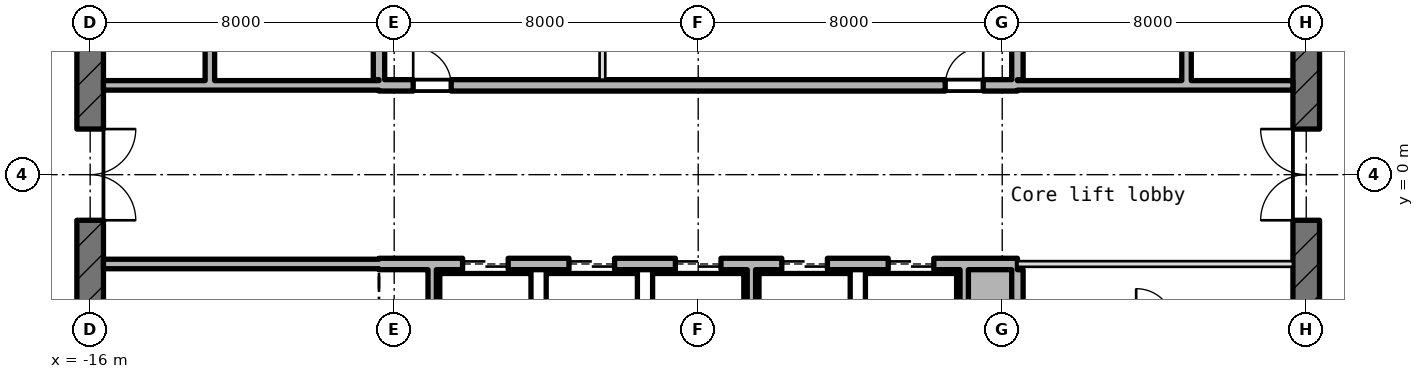
"""IFC4 building model, lengths in metres.
Left out: names, types, materials, properties, quantities, classifications, styles, units other than length and angle.
Written with IfcOpenShell. Run it as: python <this file> out.ifc"""

import sys

from ifc_helpers import new_model, si_unit, direction, frame, frame_2d, origin, place, context, subcontext, project, spatial, rectangle, extrude, element, fill, save


model = new_model("IFC4")
c1 = context("Model", 3, precision=1e-05, world=origin(), true_north=direction((0.0, 1.0)))
c2 = subcontext(c1, "Body", "Model", "MODEL_VIEW")
j1 = project(units=[si_unit("LENGTHUNIT", "METRE"), si_unit("PLANEANGLEUNIT", "RADIAN")], contexts=[c1])
p1 = place(None, origin())
s1 = spatial("IfcSite", under=j1, at=p1, CompositionType="ELEMENT")
p2 = place(p1, origin())
s2 = spatial("IfcBuilding", under=s1, at=p2, CompositionType="ELEMENT")
p3 = place(p2, frame((0.0, 0.0, 279.1)))
s3 = spatial("IfcBuildingStorey", under=s2, at=p3, CompositionType="ELEMENT", Elevation=279.1)
p4 = place(p3, frame((16.0, -10.145, -0.25), z_axis=(0.0, 0.0, 1.0), x_axis=(0.0, 1.0, 0.0)))
e1 = element("IfcWall", 1, at=p4, inside=s3, PredefinedType="SHEAR", context=c2, shape_type="SweptSolid", body=[
    extrude(rectangle(XDim=20.29, YDim=0.7, at=frame_2d((10.145, 0.0))), origin(), (0.0, 0.0, 1.0), 5.47),
])
p5 = place(p4, frame((8.945, 0.0, 0.25)))
e2 = element("IfcOpeningElement", 2, at=p5, cuts=e1, PredefinedType="OPENING", context=c2, shape_type="SweptSolid", body=[
    extrude(rectangle(XDim=2.4, YDim=2.1, at=frame_2d((1.2, 1.05))), frame((0.0, 0.36, 0.0), z_axis=(0.0, -1.0, 0.0), x_axis=(1.0, 0.0, 0.0)), (0.0, 0.0, 1.0), 0.72),
])
p6 = place(p4, frame((13.545, 0.0, 0.25)))
e3 = element("IfcOpeningElement", 3, at=p6, cuts=e1, PredefinedType="OPENING", context=c2, shape_type="SweptSolid", body=[
    extrude(rectangle(XDim=1.2, YDim=2.1, at=frame_2d((0.6, 1.05))), frame((0.0, 0.36, 0.0), z_axis=(0.0, -1.0, 0.0), x_axis=(1.0, 0.0, 0.0)), (0.0, 0.0, 1.0), 0.72),
])
p7 = place(p4, frame((4.745, 0.0, 0.25)))
e4 = element("IfcOpeningElement", 4, at=p7, cuts=e1, PredefinedType="OPENING", context=c2, shape_type="SweptSolid", body=[
    extrude(rectangle(XDim=1.2, YDim=2.1, at=frame_2d((0.6, 1.05))), frame((0.0, 0.36, 0.0), z_axis=(0.0, -1.0, 0.0), x_axis=(1.0, 0.0, 0.0)), (0.0, 0.0, 1.0), 0.72),
])
p8 = place(p3, frame((-16.0, 10.145, -0.25), z_axis=(0.0, 0.0, 1.0), x_axis=(0.0, -1.0, 0.0)))
e5 = element("IfcWall", 5, at=p8, inside=s3, PredefinedType="SHEAR", context=c2, shape_type="SweptSolid", body=[
    extrude(rectangle(XDim=20.29, YDim=0.7, at=frame_2d((10.145, 0.0))), origin(), (0.0, 0.0, 1.0), 5.47),
])
p9 = place(p8, frame((8.945, 0.0, 0.25)))
e6 = element("IfcOpeningElement", 6, at=p9, cuts=e5, PredefinedType="OPENING", context=c2, shape_type="SweptSolid", body=[
    extrude(rectangle(XDim=2.4, YDim=2.1, at=frame_2d((1.2, 1.05))), frame((0.0, 0.36, 0.0), z_axis=(0.0, -1.0, 0.0), x_axis=(1.0, 0.0, 0.0)), (0.0, 0.0, 1.0), 0.72),
])
p10 = place(p8, frame((5.545, 0.0, 0.25)))
e7 = element("IfcOpeningElement", 7, at=p10, cuts=e5, PredefinedType="OPENING", context=c2, shape_type="SweptSolid", body=[
    extrude(rectangle(XDim=1.2, YDim=2.1, at=frame_2d((0.6, 1.05))), frame((0.0, 0.36, 0.0), z_axis=(0.0, -1.0, 0.0), x_axis=(1.0, 0.0, 0.0)), (0.0, 0.0, 1.0), 0.72),
])
p11 = place(p3, frame((-15.65, -2.35, 0.0), z_axis=(0.0, 0.0, 1.0), x_axis=(1.0, 0.0, 0.0)))
e8 = element("IfcWall", 8, at=p11, inside=s3, PredefinedType="STANDARD", context=c2, shape_type="SweptSolid", body=[
    extrude(rectangle(XDim=7.25, YDim=0.25, at=frame_2d((3.625, 0.0))), origin(), (0.0, 0.0, 1.0), 5.22),
])
p12 = place(p3, frame((-8.4, -2.35, -0.25), z_axis=(0.0, 0.0, 1.0), x_axis=(1.0, 0.0, 0.0)))
e9 = element("IfcWall", 9, at=p12, inside=s3, PredefinedType="SHEAR", context=c2, shape_type="SweptSolid", body=[
    extrude(rectangle(XDim=16.8, YDim=0.3, at=frame_2d((8.4, 0.0))), origin(), (0.0, 0.0, 1.0), 5.47),
])
p13 = place(p12, frame((2.2, 0.0, 0.25)))
e10 = element("IfcOpeningElement", 10, at=p13, cuts=e9, PredefinedType="OPENING", context=c2, shape_type="SweptSolid", body=[
    extrude(rectangle(XDim=1.2, YDim=2.1, at=frame_2d((0.6, 1.05))), frame((0.0, 0.16, 0.0), z_axis=(0.0, -1.0, 0.0), x_axis=(1.0, 0.0, 0.0)), (0.0, 0.0, 1.0), 0.32),
])
p14 = place(p12, frame((5.0, 0.0, 0.25)))
e11 = element("IfcOpeningElement", 11, at=p14, cuts=e9, PredefinedType="OPENING", context=c2, shape_type="SweptSolid", body=[
    extrude(rectangle(XDim=1.2, YDim=2.1, at=frame_2d((0.6, 1.05))), frame((0.0, 0.16, 0.0), z_axis=(0.0, -1.0, 0.0), x_axis=(1.0, 0.0, 0.0)), (0.0, 0.0, 1.0), 0.32),
])
p15 = place(p12, frame((7.8, 0.0, 0.25)))
e12 = element("IfcOpeningElement", 12, at=p15, cuts=e9, PredefinedType="OPENING", context=c2, shape_type="SweptSolid", body=[
    extrude(rectangle(XDim=1.2, YDim=2.1, at=frame_2d((0.6, 1.05))), frame((0.0, 0.16, 0.0), z_axis=(0.0, -1.0, 0.0), x_axis=(1.0, 0.0, 0.0)), (0.0, 0.0, 1.0), 0.32),
])
p16 = place(p12, frame((10.6, 0.0, 0.25)))
e13 = element("IfcOpeningElement", 13, at=p16, cuts=e9, PredefinedType="OPENING", context=c2, shape_type="SweptSolid", body=[
    extrude(rectangle(XDim=1.2, YDim=2.1, at=frame_2d((0.6, 1.05))), frame((0.0, 0.16, 0.0), z_axis=(0.0, -1.0, 0.0), x_axis=(1.0, 0.0, 0.0)), (0.0, 0.0, 1.0), 0.32),
])
p17 = place(p12, frame((13.4, 0.0, 0.25)))
e14 = element("IfcOpeningElement", 14, at=p17, cuts=e9, PredefinedType="OPENING", context=c2, shape_type="SweptSolid", body=[
    extrude(rectangle(XDim=1.2, YDim=2.1, at=frame_2d((0.6, 1.05))), frame((0.0, 0.16, 0.0), z_axis=(0.0, -1.0, 0.0), x_axis=(1.0, 0.0, 0.0)), (0.0, 0.0, 1.0), 0.32),
])
p18 = place(p3, frame((8.4, -2.35, 0.0), z_axis=(0.0, 0.0, 1.0), x_axis=(1.0, 0.0, 0.0)))
e15 = element("IfcWall", 15, at=p18, inside=s3, PredefinedType="PARTITIONING", context=c2, shape_type="SweptSolid", body=[
    extrude(rectangle(XDim=7.25, YDim=0.15, at=frame_2d((3.625, 0.0))), origin(), (0.0, 0.0, 1.0), 5.22),
])
p19 = place(p3, frame((-15.65, 2.35, 0.0), z_axis=(0.0, 0.0, 1.0), x_axis=(1.0, 0.0, 0.0)))
e16 = element("IfcWall", 16, at=p19, inside=s3, PredefinedType="STANDARD", context=c2, shape_type="SweptSolid", body=[
    extrude(rectangle(XDim=7.25, YDim=0.25, at=frame_2d((3.625, 0.0))), origin(), (0.0, 0.0, 1.0), 5.22),
])
p20 = place(p3, frame((-8.4, 2.35, -0.25), z_axis=(0.0, 0.0, 1.0), x_axis=(1.0, 0.0, 0.0)))
e17 = element("IfcWall", 17, at=p20, inside=s3, PredefinedType="SHEAR", context=c2, shape_type="SweptSolid", body=[
    extrude(rectangle(XDim=16.8, YDim=0.3, at=frame_2d((8.4, 0.0))), origin(), (0.0, 0.0, 1.0), 5.47),
])
p21 = place(p20, frame((0.9, 0.0, 0.25)))
e18 = element("IfcOpeningElement", 18, at=p21, cuts=e17, PredefinedType="OPENING", context=c2, shape_type="SweptSolid", body=[
    extrude(rectangle(XDim=1.0, YDim=2.1, at=frame_2d((0.5, 1.05))), frame((0.0, 0.16, 0.0), z_axis=(0.0, -1.0, 0.0), x_axis=(1.0, 0.0, 0.0)), (0.0, 0.0, 1.0), 0.32),
])
p22 = place(p20, frame((14.9, 0.0, 0.25)))
e19 = element("IfcOpeningElement", 19, at=p22, cuts=e17, PredefinedType="OPENING", context=c2, shape_type="SweptSolid", body=[
    extrude(rectangle(XDim=1.0, YDim=2.1, at=frame_2d((0.5, 1.05))), frame((0.0, 0.16, 0.0), z_axis=(0.0, -1.0, 0.0), x_axis=(1.0, 0.0, 0.0)), (0.0, 0.0, 1.0), 0.32),
])
p23 = place(p3, frame((8.4, 2.35, 0.0), z_axis=(0.0, 0.0, 1.0), x_axis=(1.0, 0.0, 0.0)))
e20 = element("IfcWall", 20, at=p23, inside=s3, PredefinedType="STANDARD", context=c2, shape_type="SweptSolid", body=[
    extrude(rectangle(XDim=7.25, YDim=0.25, at=frame_2d((3.625, 0.0))), origin(), (0.0, 0.0, 1.0), 5.22),
])
p24 = place(p3, frame((-12.85, 2.475, 0.0), z_axis=(0.0, 0.0, 1.0), x_axis=(0.0, 1.0, 0.0)))
e21 = element("IfcWall", 21, at=p24, inside=s3, PredefinedType="STANDARD", context=c2, shape_type="SweptSolid", body=[
    extrude(rectangle(XDim=3.05, YDim=0.25, at=frame_2d((1.525, 0.0))), origin(), (0.0, 0.0, 1.0), 5.22),
])
p25 = place(p3, frame((-8.4, 2.5, -0.25), z_axis=(0.0, 0.0, 1.0), x_axis=(0.0, 1.0, 0.0)))
e22 = element("IfcWall", 22, at=p25, inside=s3, PredefinedType="SHEAR", context=c2, shape_type="SweptSolid", body=[
    extrude(rectangle(XDim=5.85, YDim=0.3, at=frame_2d((2.925, 0.0))), origin(), (0.0, 0.0, 1.0), 5.47),
])
p26 = place(p3, frame((-7.0, -5.24, 0.0), z_axis=(0.0, 0.0, 1.0), x_axis=(0.0, 1.0, 0.0)))
e23 = element("IfcWall", 23, at=p26, inside=s3, PredefinedType="STANDARD", context=c2, shape_type="SweptSolid", body=[
    extrude(rectangle(XDim=2.74, YDim=0.22, at=frame_2d((1.37, 0.0))), origin(), (0.0, 0.0, 1.0), 5.22),
])
p27 = place(p3, frame((-2.52, 2.5, 0.0), z_axis=(0.0, 0.0, 1.0), x_axis=(0.0, 1.0, 0.0)))
e24 = element("IfcWall", 24, at=p27, inside=s3, PredefinedType="PARTITIONING", context=c2, shape_type="SweptSolid", body=[
    extrude(rectangle(XDim=2.74, YDim=0.15, at=frame_2d((1.37, 0.0))), origin(), (0.0, 0.0, 1.0), 5.22),
])
for number, where, z_axis, x_axis in (
    (25, (1.4, -5.24, 0.0), (0.0, 0.0, 1.0), (0.0, 1.0, 0.0)),
    (26, (7.0, -5.24, 0.0), (0.0, 0.0, 1.0), (0.0, 1.0, 0.0)),
):
    element("IfcWall", number, at=place(p3, frame(where, z_axis=z_axis, x_axis=x_axis)), inside=s3, PredefinedType="STANDARD", context=c2, shape_type="SweptSolid", body=[
        extrude(rectangle(XDim=2.74, YDim=0.22, at=frame_2d((1.37, 0.0))), origin(), (0.0, 0.0, 1.0), 5.22),
    ])
for number, where, z_axis, x_axis in (
    (27, (8.4, -8.35, -0.25), (0.0, 0.0, 1.0), (0.0, 1.0, 0.0)),
    (28, (8.4, 2.5, -0.25), (0.0, 0.0, 1.0), (0.0, 1.0, 0.0)),
):
    element("IfcWall", number, at=place(p3, frame(where, z_axis=z_axis, x_axis=x_axis)), inside=s3, PredefinedType="SHEAR", context=c2, shape_type="SweptSolid", body=[
        extrude(rectangle(XDim=5.85, YDim=0.3, at=frame_2d((2.925, 0.0))), origin(), (0.0, 0.0, 1.0), 5.47),
    ])
p28 = place(p3, frame((12.85, 2.475, 0.0), z_axis=(0.0, 0.0, 1.0), x_axis=(0.0, 1.0, 0.0)))
e29 = element("IfcWall", 29, at=p28, inside=s3, PredefinedType="STANDARD", context=c2, shape_type="SweptSolid", body=[
    extrude(rectangle(XDim=3.05, YDim=0.25, at=frame_2d((1.525, 0.0))), origin(), (0.0, 0.0, 1.0), 5.22),
])
p29 = place(p13, origin())
e30 = element("IfcDoor", 30, at=p29, inside=s3, OperationType="DOUBLE_DOOR_SLIDING", PredefinedType="DOOR", context=c2, shape_type="SweptSolid", body=[
    extrude(rectangle(XDim=1.2, YDim=2.1, at=frame_2d((0.6, 1.05))), frame((0.0, 0.025, 0.0), z_axis=(0.0, -1.0, 0.0), x_axis=(1.0, 0.0, 0.0)), (0.0, 0.0, 1.0), 0.05),
])
fill(e10, e30)
p30 = place(p14, origin())
e31 = element("IfcDoor", 31, at=p30, inside=s3, OperationType="DOUBLE_DOOR_SLIDING", PredefinedType="DOOR", context=c2, shape_type="SweptSolid", body=[
    extrude(rectangle(XDim=1.2, YDim=2.1, at=frame_2d((0.6, 1.05))), frame((0.0, 0.025, 0.0), z_axis=(0.0, -1.0, 0.0), x_axis=(1.0, 0.0, 0.0)), (0.0, 0.0, 1.0), 0.05),
])
fill(e11, e31)
p31 = place(p15, origin())
e32 = element("IfcDoor", 32, at=p31, inside=s3, OperationType="DOUBLE_DOOR_SLIDING", PredefinedType="DOOR", context=c2, shape_type="SweptSolid", body=[
    extrude(rectangle(XDim=1.2, YDim=2.1, at=frame_2d((0.6, 1.05))), frame((0.0, 0.025, 0.0), z_axis=(0.0, -1.0, 0.0), x_axis=(1.0, 0.0, 0.0)), (0.0, 0.0, 1.0), 0.05),
])
fill(e12, e32)
p32 = place(p16, origin())
e33 = element("IfcDoor", 33, at=p32, inside=s3, OperationType="DOUBLE_DOOR_SLIDING", PredefinedType="DOOR", context=c2, shape_type="SweptSolid", body=[
    extrude(rectangle(XDim=1.2, YDim=2.1, at=frame_2d((0.6, 1.05))), frame((0.0, 0.025, 0.0), z_axis=(0.0, -1.0, 0.0), x_axis=(1.0, 0.0, 0.0)), (0.0, 0.0, 1.0), 0.05),
])
fill(e13, e33)
p33 = place(p17, origin())
e34 = element("IfcDoor", 34, at=p33, inside=s3, OperationType="DOUBLE_DOOR_SLIDING", PredefinedType="DOOR", context=c2, shape_type="SweptSolid", body=[
    extrude(rectangle(XDim=1.2, YDim=2.1, at=frame_2d((0.6, 1.05))), frame((0.0, 0.025, 0.0), z_axis=(0.0, -1.0, 0.0), x_axis=(1.0, 0.0, 0.0)), (0.0, 0.0, 1.0), 0.05),
])
fill(e14, e34)
p34 = place(p9, origin())
e35 = element("IfcDoor", 35, at=p34, inside=s3, OperationType="DOUBLE_DOOR_SINGLE_SWING", PredefinedType="DOOR", context=c2, shape_type="SweptSolid", body=[
    extrude(rectangle(XDim=2.4, YDim=2.1, at=frame_2d((1.2, 1.05))), frame((0.0, 0.025, 0.0), z_axis=(0.0, -1.0, 0.0), x_axis=(1.0, 0.0, 0.0)), (0.0, 0.0, 1.0), 0.05),
])
fill(e6, e35)
p35 = place(p5, origin())
e36 = element("IfcDoor", 36, at=p35, inside=s3, OperationType="DOUBLE_DOOR_SINGLE_SWING", PredefinedType="DOOR", context=c2, shape_type="SweptSolid", body=[
    extrude(rectangle(XDim=2.4, YDim=2.1, at=frame_2d((1.2, 1.05))), frame((0.0, 0.025, 0.0), z_axis=(0.0, -1.0, 0.0), x_axis=(1.0, 0.0, 0.0)), (0.0, 0.0, 1.0), 0.05),
])
fill(e2, e36)
p36 = place(p21, origin())
e37 = element("IfcDoor", 37, at=p36, inside=s3, OperationType="SINGLE_SWING_RIGHT", PredefinedType="DOOR", context=c2, shape_type="SweptSolid", body=[
    extrude(rectangle(XDim=1.0, YDim=2.1, at=frame_2d((0.5, 1.05))), frame((0.0, 0.025, 0.0), z_axis=(0.0, -1.0, 0.0), x_axis=(1.0, 0.0, 0.0)), (0.0, 0.0, 1.0), 0.05),
])
fill(e18, e37)
p37 = place(p22, origin())
e38 = element("IfcDoor", 38, at=p37, inside=s3, OperationType="SINGLE_SWING_RIGHT", PredefinedType="DOOR", context=c2, shape_type="SweptSolid", body=[
    extrude(rectangle(XDim=1.0, YDim=2.1, at=frame_2d((0.5, 1.05))), frame((0.0, 0.025, 0.0), z_axis=(0.0, -1.0, 0.0), x_axis=(1.0, 0.0, 0.0)), (0.0, 0.0, 1.0), 0.05),
])
fill(e19, e38)
save(model, sys.argv[1])
